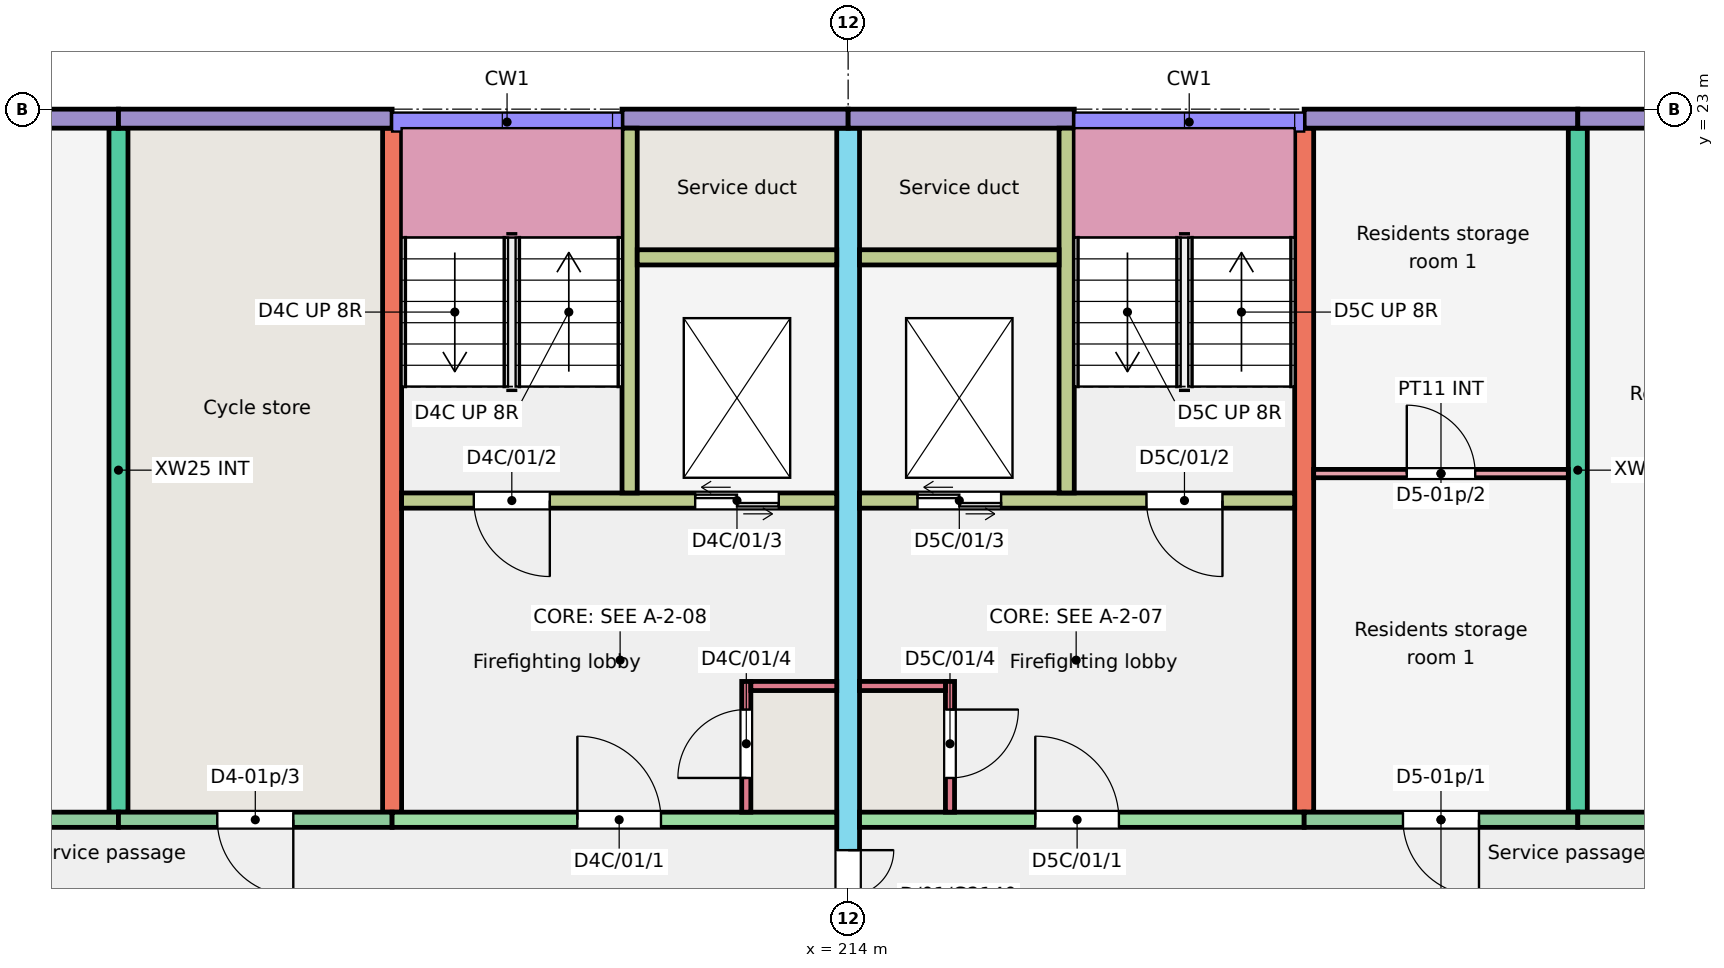
"""IFC4 building model, lengths in metres.
Left out: names, types, materials, properties, quantities, classifications, styles, units other than length and angle.
Written with IfcOpenShell. Run it as: python <this file> out.ifc"""

import sys

from ifc_helpers import new_model, si_unit, direction, frame, frame_2d, origin, place, context, subcontext, project, spatial, rectangle, extrude, element, fill, save


model = new_model("IFC4")
c1 = context("Model", 3, precision=1e-05, world=origin(), true_north=direction((0.0, 1.0)))
c2 = subcontext(c1, "Body", "Model", "MODEL_VIEW")
j1 = project(units=[si_unit("LENGTHUNIT", "METRE"), si_unit("PLANEANGLEUNIT", "RADIAN")], contexts=[c1])
p1 = place(None, origin())
s1 = spatial("IfcSite", under=j1, at=p1, CompositionType="ELEMENT")
p2 = place(p1, origin())
s2 = spatial("IfcBuilding", under=s1, at=p2, CompositionType="ELEMENT")
p3 = place(p2, frame((0.0, 0.0, 3.0)))
s3 = spatial("IfcBuildingStorey", under=s2, at=p3, CompositionType="ELEMENT", Elevation=3.0)
for number, where, z_axis, x_axis in (
    (1, (204.4, 13.75, 0.0), (0.0, 0.0, 1.0), (0.0, 1.0, 0.0)),
    (2, (208.0, 13.75, 0.0), (0.0, 0.0, 1.0), (0.0, 1.0, 0.0)),
):
    element("IfcWall", number, at=place(p3, frame(where, z_axis=z_axis, x_axis=x_axis)), inside=s3, PredefinedType="SHEAR", context=c2, shape_type="SweptSolid", body=[
        extrude(rectangle(XDim=9.0, YDim=0.25, at=frame_2d((4.5, 0.0))), origin(), (0.0, 0.0, 1.0), 3.0),
    ])
p4 = place(p3, frame((214.0, 11.75, 0.0), z_axis=(0.0, 0.0, 1.0), x_axis=(0.0, 1.0, 0.0)))
e3 = element("IfcWall", 3, at=p4, inside=s3, PredefinedType="SHEAR", context=c2, shape_type="SweptSolid", body=[
    extrude(rectangle(XDim=11.0, YDim=0.3, at=frame_2d((5.5, 0.0))), origin(), (0.0, 0.0, 1.0), 3.0),
])
p5 = place(p4, frame((0.3, 0.0, 0.0)))
e4 = element("IfcOpeningElement", 4, at=p5, cuts=e3, PredefinedType="OPENING", context=c2, shape_type="SweptSolid", body=[
    extrude(rectangle(XDim=1.2, YDim=2.1, at=frame_2d((0.6, 1.05))), frame((0.0, 0.16, 0.0), z_axis=(0.0, -1.0, 0.0), x_axis=(1.0, 0.0, 0.0)), (0.0, 0.0, 1.0), 0.32),
])
for number, where, z_axis, x_axis in (
    (5, (220.0, 13.75, 0.0), (0.0, 0.0, 1.0), (0.0, 1.0, 0.0)),
    (6, (223.6, 13.75, 0.0), (0.0, 0.0, 1.0), (0.0, 1.0, 0.0)),
):
    element("IfcWall", number, at=place(p3, frame(where, z_axis=z_axis, x_axis=x_axis)), inside=s3, PredefinedType="SHEAR", context=c2, shape_type="SweptSolid", body=[
        extrude(rectangle(XDim=9.0, YDim=0.25, at=frame_2d((4.5, 0.0))), origin(), (0.0, 0.0, 1.0), 3.0),
    ])
p6 = place(p3, frame((200.8, 22.875, 0.0), z_axis=(0.0, 0.0, 1.0), x_axis=(1.0, 0.0, 0.0)))
e7 = element("IfcWall", 7, at=p6, inside=s3, PredefinedType="SOLIDWALL", context=c2, shape_type="SweptSolid", body=[
    extrude(rectangle(XDim=3.6, YDim=0.25, at=frame_2d((1.8, 0.0))), origin(), (0.0, 0.0, 1.0), 3.0),
])
p7 = place(p3, frame((200.8, 13.65, 0.0), z_axis=(0.0, 0.0, 1.0), x_axis=(1.0, 0.0, 0.0)))
e8 = element("IfcWall", 8, at=p7, inside=s3, PredefinedType="SOLIDWALL", context=c2, shape_type="SweptSolid", body=[
    extrude(rectangle(XDim=3.6, YDim=0.2, at=frame_2d((1.8, 0.0))), origin(), (0.0, 0.0, 1.0), 3.0),
])
p8 = place(p7, frame((1.3, 0.0, 0.0)))
e9 = element("IfcOpeningElement", 9, at=p8, cuts=e8, PredefinedType="OPENING", context=c2, shape_type="SweptSolid", body=[
    extrude(rectangle(XDim=1.0, YDim=2.1, at=frame_2d((0.5, 1.05))), frame((0.0, 0.11, 0.0), z_axis=(0.0, -1.0, 0.0), x_axis=(1.0, 0.0, 0.0)), (0.0, 0.0, 1.0), 0.22),
])
p9 = place(p3, frame((204.4, 22.875, 0.0), z_axis=(0.0, 0.0, 1.0), x_axis=(1.0, 0.0, 0.0)))
e10 = element("IfcWall", 10, at=p9, inside=s3, PredefinedType="SOLIDWALL", context=c2, shape_type="SweptSolid", body=[
    extrude(rectangle(XDim=3.6, YDim=0.25, at=frame_2d((1.8, 0.0))), origin(), (0.0, 0.0, 1.0), 3.0),
])
p10 = place(p3, frame((204.4, 13.65, 0.0), z_axis=(0.0, 0.0, 1.0), x_axis=(1.0, 0.0, 0.0)))
e11 = element("IfcWall", 11, at=p10, inside=s3, PredefinedType="SOLIDWALL", context=c2, shape_type="SweptSolid", body=[
    extrude(rectangle(XDim=3.6, YDim=0.2, at=frame_2d((1.8, 0.0))), origin(), (0.0, 0.0, 1.0), 3.0),
])
p11 = place(p10, frame((1.3, 0.0, 0.0)))
e12 = element("IfcOpeningElement", 12, at=p11, cuts=e11, PredefinedType="OPENING", context=c2, shape_type="SweptSolid", body=[
    extrude(rectangle(XDim=1.0, YDim=2.1, at=frame_2d((0.5, 1.05))), frame((0.0, 0.11, 0.0), z_axis=(0.0, -1.0, 0.0), x_axis=(1.0, 0.0, 0.0)), (0.0, 0.0, 1.0), 0.22),
])
p12 = place(p3, frame((211.025, 22.875, 0.0), z_axis=(0.0, 0.0, 1.0), x_axis=(1.0, 0.0, 0.0)))
e13 = element("IfcWall", 13, at=p12, inside=s3, PredefinedType="SOLIDWALL", context=c2, shape_type="SweptSolid", body=[
    extrude(rectangle(XDim=2.975, YDim=0.25, at=frame_2d((1.488, 0.0))), origin(), (0.0, 0.0, 1.0), 3.0),
])
p13 = place(p3, frame((208.0, 13.65, 0.0), z_axis=(0.0, 0.0, 1.0), x_axis=(1.0, 0.0, 0.0)))
e14 = element("IfcWall", 14, at=p13, inside=s3, PredefinedType="SHEAR", context=c2, shape_type="SweptSolid", body=[
    extrude(rectangle(XDim=5.85, YDim=0.2, at=frame_2d((2.925, 0.0))), origin(), (0.0, 0.0, 1.0), 3.0),
])
p14 = place(p13, frame((2.438, 0.0, 0.0)))
e15 = element("IfcOpeningElement", 15, at=p14, cuts=e14, PredefinedType="OPENING", context=c2, shape_type="SweptSolid", body=[
    extrude(rectangle(XDim=1.1, YDim=2.1, at=frame_2d((0.55, 1.05))), frame((0.0, 0.11, 0.0), z_axis=(0.0, -1.0, 0.0), x_axis=(1.0, 0.0, 0.0)), (0.0, 0.0, 1.0), 0.22),
])
p15 = place(p3, frame((208.125, 17.85, 0.0), z_axis=(0.0, 0.0, 1.0), x_axis=(1.0, 0.0, 0.0)))
e16 = element("IfcWall", 16, at=p15, inside=s3, PredefinedType="SHEAR", context=c2, shape_type="SweptSolid", body=[
    extrude(rectangle(XDim=5.725, YDim=0.2, at=frame_2d((2.863, 0.0))), origin(), (0.0, 0.0, 1.0), 3.0),
])
p16 = place(p15, frame((0.95, 0.0, 0.0)))
e17 = element("IfcOpeningElement", 17, at=p16, cuts=e16, PredefinedType="OPENING", context=c2, shape_type="SweptSolid", body=[
    extrude(rectangle(XDim=1.0, YDim=2.1, at=frame_2d((0.5, 1.05))), frame((0.0, 0.11, 0.0), z_axis=(0.0, -1.0, 0.0), x_axis=(1.0, 0.0, 0.0)), (0.0, 0.0, 1.0), 0.22),
])
p17 = place(p15, frame((3.863, 0.0, 0.0)))
e18 = element("IfcOpeningElement", 18, at=p17, cuts=e16, PredefinedType="OPENING", context=c2, shape_type="SweptSolid", body=[
    extrude(rectangle(XDim=1.1, YDim=2.1, at=frame_2d((0.55, 1.05))), frame((0.0, 0.11, 0.0), z_axis=(0.0, -1.0, 0.0), x_axis=(1.0, 0.0, 0.0)), (0.0, 0.0, 1.0), 0.22),
])
p18 = place(p3, frame((211.125, 17.95, 0.0), z_axis=(0.0, 0.0, 1.0), x_axis=(0.0, 1.0, 0.0)))
e19 = element("IfcWall", 19, at=p18, inside=s3, PredefinedType="SHEAR", context=c2, shape_type="SweptSolid", body=[
    extrude(rectangle(XDim=4.8, YDim=0.2, at=frame_2d((2.4, 0.0))), origin(), (0.0, 0.0, 1.0), 3.0),
])
p19 = place(p3, frame((211.225, 21.05, 0.0), z_axis=(0.0, 0.0, 1.0), x_axis=(1.0, 0.0, 0.0)))
e20 = element("IfcWall", 20, at=p19, inside=s3, PredefinedType="SHEAR", context=c2, shape_type="SweptSolid", body=[
    extrude(rectangle(XDim=2.625, YDim=0.2, at=frame_2d((1.312, 0.0))), origin(), (0.0, 0.0, 1.0), 3.0),
])
p20 = place(p3, frame((212.66, 13.75, 0.0), z_axis=(0.0, 0.0, 1.0), x_axis=(0.0, 1.0, 0.0)))
e21 = element("IfcWall", 21, at=p20, inside=s3, PredefinedType="SHEAR", context=c2, shape_type="SweptSolid", body=[
    extrude(rectangle(XDim=1.72, YDim=0.12, at=frame_2d((0.86, 0.0))), origin(), (0.0, 0.0, 1.0), 3.0),
])
p21 = place(p20, frame((0.45, 0.0, 0.0)))
e22 = element("IfcOpeningElement", 22, at=p21, cuts=e21, PredefinedType="OPENING", context=c2, shape_type="SweptSolid", body=[
    extrude(rectangle(XDim=0.9, YDim=2.1, at=frame_2d((0.45, 1.05))), frame((0.0, 0.07, 0.0), z_axis=(0.0, -1.0, 0.0), x_axis=(1.0, 0.0, 0.0)), (0.0, 0.0, 1.0), 0.14),
])
p22 = place(p3, frame((212.72, 15.41, 0.0), z_axis=(0.0, 0.0, 1.0), x_axis=(1.0, 0.0, 0.0)))
e23 = element("IfcWall", 23, at=p22, inside=s3, PredefinedType="SHEAR", context=c2, shape_type="SweptSolid", body=[
    extrude(rectangle(XDim=1.13, YDim=0.12, at=frame_2d((0.565, 0.0))), origin(), (0.0, 0.0, 1.0), 3.0),
])
p23 = place(p3, frame((214.0, 22.875, 0.0), z_axis=(0.0, 0.0, 1.0), x_axis=(1.0, 0.0, 0.0)))
e24 = element("IfcWall", 24, at=p23, inside=s3, PredefinedType="SOLIDWALL", context=c2, shape_type="SweptSolid", body=[
    extrude(rectangle(XDim=2.975, YDim=0.25, at=frame_2d((1.488, 0.0))), origin(), (0.0, 0.0, 1.0), 3.0),
])
p24 = place(p3, frame((214.15, 13.65, 0.0), z_axis=(0.0, 0.0, 1.0), x_axis=(1.0, 0.0, 0.0)))
e25 = element("IfcWall", 25, at=p24, inside=s3, PredefinedType="SHEAR", context=c2, shape_type="SweptSolid", body=[
    extrude(rectangle(XDim=5.85, YDim=0.2, at=frame_2d((2.925, 0.0))), origin(), (0.0, 0.0, 1.0), 3.0),
])
p25 = place(p24, frame((2.312, 0.0, 0.0)))
e26 = element("IfcOpeningElement", 26, at=p25, cuts=e25, PredefinedType="OPENING", context=c2, shape_type="SweptSolid", body=[
    extrude(rectangle(XDim=1.1, YDim=2.1, at=frame_2d((0.55, 1.05))), frame((0.0, 0.11, 0.0), z_axis=(0.0, -1.0, 0.0), x_axis=(1.0, 0.0, 0.0)), (0.0, 0.0, 1.0), 0.22),
])
p26 = place(p3, frame((214.15, 17.85, 0.0), z_axis=(0.0, 0.0, 1.0), x_axis=(1.0, 0.0, 0.0)))
e27 = element("IfcWall", 27, at=p26, inside=s3, PredefinedType="SHEAR", context=c2, shape_type="SweptSolid", body=[
    extrude(rectangle(XDim=5.725, YDim=0.2, at=frame_2d((2.863, 0.0))), origin(), (0.0, 0.0, 1.0), 3.0),
])
p27 = place(p26, frame((3.775, 0.0, 0.0)))
e28 = element("IfcOpeningElement", 28, at=p27, cuts=e27, PredefinedType="OPENING", context=c2, shape_type="SweptSolid", body=[
    extrude(rectangle(XDim=1.0, YDim=2.1, at=frame_2d((0.5, 1.05))), frame((0.0, 0.11, 0.0), z_axis=(0.0, -1.0, 0.0), x_axis=(1.0, 0.0, 0.0)), (0.0, 0.0, 1.0), 0.22),
])
p28 = place(p26, frame((0.762, 0.0, 0.0)))
e29 = element("IfcOpeningElement", 29, at=p28, cuts=e27, PredefinedType="OPENING", context=c2, shape_type="SweptSolid", body=[
    extrude(rectangle(XDim=1.1, YDim=2.1, at=frame_2d((0.55, 1.05))), frame((0.0, 0.11, 0.0), z_axis=(0.0, -1.0, 0.0), x_axis=(1.0, 0.0, 0.0)), (0.0, 0.0, 1.0), 0.22),
])
p29 = place(p3, frame((216.875, 17.95, 0.0), z_axis=(0.0, 0.0, 1.0), x_axis=(0.0, 1.0, 0.0)))
e30 = element("IfcWall", 30, at=p29, inside=s3, PredefinedType="SHEAR", context=c2, shape_type="SweptSolid", body=[
    extrude(rectangle(XDim=4.8, YDim=0.2, at=frame_2d((2.4, 0.0))), origin(), (0.0, 0.0, 1.0), 3.0),
])
p30 = place(p3, frame((214.15, 21.05, 0.0), z_axis=(0.0, 0.0, 1.0), x_axis=(1.0, 0.0, 0.0)))
e31 = element("IfcWall", 31, at=p30, inside=s3, PredefinedType="SHEAR", context=c2, shape_type="SweptSolid", body=[
    extrude(rectangle(XDim=2.625, YDim=0.2, at=frame_2d((1.312, 0.0))), origin(), (0.0, 0.0, 1.0), 3.0),
])
p31 = place(p3, frame((215.34, 13.75, 0.0), z_axis=(0.0, 0.0, 1.0), x_axis=(0.0, 1.0, 0.0)))
e32 = element("IfcWall", 32, at=p31, inside=s3, PredefinedType="SHEAR", context=c2, shape_type="SweptSolid", body=[
    extrude(rectangle(XDim=1.72, YDim=0.12, at=frame_2d((0.86, 0.0))), origin(), (0.0, 0.0, 1.0), 3.0),
])
p32 = place(p31, frame((0.45, 0.0, 0.0)))
e33 = element("IfcOpeningElement", 33, at=p32, cuts=e32, PredefinedType="OPENING", context=c2, shape_type="SweptSolid", body=[
    extrude(rectangle(XDim=0.9, YDim=2.1, at=frame_2d((0.45, 1.05))), frame((0.0, 0.07, 0.0), z_axis=(0.0, -1.0, 0.0), x_axis=(1.0, 0.0, 0.0)), (0.0, 0.0, 1.0), 0.14),
])
p33 = place(p3, frame((214.15, 15.41, 0.0), z_axis=(0.0, 0.0, 1.0), x_axis=(1.0, 0.0, 0.0)))
e34 = element("IfcWall", 34, at=p33, inside=s3, PredefinedType="SHEAR", context=c2, shape_type="SweptSolid", body=[
    extrude(rectangle(XDim=1.13, YDim=0.12, at=frame_2d((0.565, 0.0))), origin(), (0.0, 0.0, 1.0), 3.0),
])
p34 = place(p3, frame((220.0, 22.875, 0.0), z_axis=(0.0, 0.0, 1.0), x_axis=(1.0, 0.0, 0.0)))
e35 = element("IfcWall", 35, at=p34, inside=s3, PredefinedType="SOLIDWALL", context=c2, shape_type="SweptSolid", body=[
    extrude(rectangle(XDim=3.6, YDim=0.25, at=frame_2d((1.8, 0.0))), origin(), (0.0, 0.0, 1.0), 3.0),
])
p35 = place(p3, frame((220.0, 13.65, 0.0), z_axis=(0.0, 0.0, 1.0), x_axis=(1.0, 0.0, 0.0)))
e36 = element("IfcWall", 36, at=p35, inside=s3, PredefinedType="SOLIDWALL", context=c2, shape_type="SweptSolid", body=[
    extrude(rectangle(XDim=3.6, YDim=0.2, at=frame_2d((1.8, 0.0))), origin(), (0.0, 0.0, 1.0), 3.0),
])
p36 = place(p35, frame((1.3, 0.0, 0.0)))
e37 = element("IfcOpeningElement", 37, at=p36, cuts=e36, PredefinedType="OPENING", context=c2, shape_type="SweptSolid", body=[
    extrude(rectangle(XDim=1.0, YDim=2.1, at=frame_2d((0.5, 1.05))), frame((0.0, 0.11, 0.0), z_axis=(0.0, -1.0, 0.0), x_axis=(1.0, 0.0, 0.0)), (0.0, 0.0, 1.0), 0.22),
])
p37 = place(p3, frame((223.6, 22.875, 0.0), z_axis=(0.0, 0.0, 1.0), x_axis=(1.0, 0.0, 0.0)))
e38 = element("IfcWall", 38, at=p37, inside=s3, PredefinedType="SOLIDWALL", context=c2, shape_type="SweptSolid", body=[
    extrude(rectangle(XDim=3.6, YDim=0.25, at=frame_2d((1.8, 0.0))), origin(), (0.0, 0.0, 1.0), 3.0),
])
p38 = place(p3, frame((223.6, 13.65, 0.0), z_axis=(0.0, 0.0, 1.0), x_axis=(1.0, 0.0, 0.0)))
e39 = element("IfcWall", 39, at=p38, inside=s3, PredefinedType="SOLIDWALL", context=c2, shape_type="SweptSolid", body=[
    extrude(rectangle(XDim=3.6, YDim=0.2, at=frame_2d((1.8, 0.0))), origin(), (0.0, 0.0, 1.0), 3.0),
])
p39 = place(p38, frame((1.3, 0.0, 0.0)))
e40 = element("IfcOpeningElement", 40, at=p39, cuts=e39, PredefinedType="OPENING", context=c2, shape_type="SweptSolid", body=[
    extrude(rectangle(XDim=1.0, YDim=2.1, at=frame_2d((0.5, 1.05))), frame((0.0, 0.11, 0.0), z_axis=(0.0, -1.0, 0.0), x_axis=(1.0, 0.0, 0.0)), (0.0, 0.0, 1.0), 0.22),
])
p40 = place(p3, frame((220.125, 18.205, 0.0), z_axis=(0.0, 0.0, 1.0), x_axis=(1.0, 0.0, 0.0)))
e41 = element("IfcWall", 41, at=p40, inside=s3, PredefinedType="PARTITIONING", context=c2, shape_type="SweptSolid", body=[
    extrude(rectangle(XDim=3.35, YDim=0.11, at=frame_2d((1.675, 0.0))), origin(), (0.0, 0.0, 1.0), 2.8),
])
p41 = place(p40, frame((1.225, 0.0, 0.0)))
e42 = element("IfcOpeningElement", 42, at=p41, cuts=e41, PredefinedType="OPENING", context=c2, shape_type="SweptSolid", body=[
    extrude(rectangle(XDim=0.9, YDim=2.1, at=frame_2d((0.45, 1.05))), frame((0.0, 0.065, 0.0), z_axis=(0.0, -1.0, 0.0), x_axis=(1.0, 0.0, 0.0)), (0.0, 0.0, 1.0), 0.13),
])
p42 = place(p11, origin())
e43 = element("IfcDoor", 43, at=p42, inside=s3, OperationType="SINGLE_SWING_RIGHT", PredefinedType="DOOR", context=c2, shape_type="SweptSolid", body=[
    extrude(rectangle(XDim=1.0, YDim=2.1, at=frame_2d((0.5, 1.05))), frame((0.0, 0.025, 0.0), z_axis=(0.0, -1.0, 0.0), x_axis=(1.0, 0.0, 0.0)), (0.0, 0.0, 1.0), 0.05),
])
fill(e12, e43)
p43 = place(p36, origin())
e44 = element("IfcDoor", 44, at=p43, inside=s3, OperationType="SINGLE_SWING_RIGHT", PredefinedType="DOOR", context=c2, shape_type="SweptSolid", body=[
    extrude(rectangle(XDim=1.0, YDim=2.1, at=frame_2d((0.5, 1.05))), frame((0.0, 0.025, 0.0), z_axis=(0.0, -1.0, 0.0), x_axis=(1.0, 0.0, 0.0)), (0.0, 0.0, 1.0), 0.05),
])
fill(e37, e44)
p44 = place(p41, origin())
e45 = element("IfcDoor", 45, at=p44, inside=s3, OperationType="SINGLE_SWING_LEFT", PredefinedType="DOOR", context=c2, shape_type="SweptSolid", body=[
    extrude(rectangle(XDim=0.9, YDim=2.1, at=frame_2d((0.45, 1.05))), frame((0.0, 0.025, 0.0), z_axis=(0.0, -1.0, 0.0), x_axis=(1.0, 0.0, 0.0)), (0.0, 0.0, 1.0), 0.05),
])
fill(e42, e45)
p45 = place(p14, origin())
e46 = element("IfcDoor", 46, at=p45, inside=s3, OperationType="SINGLE_SWING_LEFT", PredefinedType="DOOR", context=c2, shape_type="SweptSolid", body=[
    extrude(rectangle(XDim=1.1, YDim=2.1, at=frame_2d((0.55, 1.05))), frame((0.0, 0.025, 0.0), z_axis=(0.0, -1.0, 0.0), x_axis=(1.0, 0.0, 0.0)), (0.0, 0.0, 1.0), 0.05),
])
fill(e15, e46)
p46 = place(p16, origin())
e47 = element("IfcDoor", 47, at=p46, inside=s3, OperationType="SINGLE_SWING_RIGHT", PredefinedType="DOOR", context=c2, shape_type="SweptSolid", body=[
    extrude(rectangle(XDim=1.0, YDim=2.1, at=frame_2d((0.5, 1.05))), frame((0.0, 0.025, 0.0), z_axis=(0.0, -1.0, 0.0), x_axis=(1.0, 0.0, 0.0)), (0.0, 0.0, 1.0), 0.05),
])
fill(e17, e47)
p47 = place(p17, origin())
e48 = element("IfcDoor", 48, at=p47, inside=s3, OperationType="DOUBLE_DOOR_SLIDING", PredefinedType="DOOR", context=c2, shape_type="SweptSolid", body=[
    extrude(rectangle(XDim=1.1, YDim=2.1, at=frame_2d((0.55, 1.05))), frame((0.0, 0.025, 0.0), z_axis=(0.0, -1.0, 0.0), x_axis=(1.0, 0.0, 0.0)), (0.0, 0.0, 1.0), 0.05),
])
fill(e18, e48)
p48 = place(p21, origin())
e49 = element("IfcDoor", 49, at=p48, inside=s3, OperationType="SINGLE_SWING_LEFT", PredefinedType="DOOR", context=c2, shape_type="SweptSolid", body=[
    extrude(rectangle(XDim=0.9, YDim=2.1, at=frame_2d((0.45, 1.05))), frame((0.0, 0.025, 0.0), z_axis=(0.0, -1.0, 0.0), x_axis=(1.0, 0.0, 0.0)), (0.0, 0.0, 1.0), 0.05),
])
fill(e22, e49)
p49 = place(p25, origin())
e50 = element("IfcDoor", 50, at=p49, inside=s3, OperationType="SINGLE_SWING_LEFT", PredefinedType="DOOR", context=c2, shape_type="SweptSolid", body=[
    extrude(rectangle(XDim=1.1, YDim=2.1, at=frame_2d((0.55, 1.05))), frame((0.0, 0.025, 0.0), z_axis=(0.0, -1.0, 0.0), x_axis=(1.0, 0.0, 0.0)), (0.0, 0.0, 1.0), 0.05),
])
fill(e26, e50)
p50 = place(p27, origin())
e51 = element("IfcDoor", 51, at=p50, inside=s3, OperationType="SINGLE_SWING_RIGHT", PredefinedType="DOOR", context=c2, shape_type="SweptSolid", body=[
    extrude(rectangle(XDim=1.0, YDim=2.1, at=frame_2d((0.5, 1.05))), frame((0.0, 0.025, 0.0), z_axis=(0.0, -1.0, 0.0), x_axis=(1.0, 0.0, 0.0)), (0.0, 0.0, 1.0), 0.05),
])
fill(e28, e51)
p51 = place(p28, origin())
e52 = element("IfcDoor", 52, at=p51, inside=s3, OperationType="DOUBLE_DOOR_SLIDING", PredefinedType="DOOR", context=c2, shape_type="SweptSolid", body=[
    extrude(rectangle(XDim=1.1, YDim=2.1, at=frame_2d((0.55, 1.05))), frame((0.0, 0.025, 0.0), z_axis=(0.0, -1.0, 0.0), x_axis=(1.0, 0.0, 0.0)), (0.0, 0.0, 1.0), 0.05),
])
fill(e29, e52)
p52 = place(p32, origin())
e53 = element("IfcDoor", 53, at=p52, inside=s3, OperationType="SINGLE_SWING_RIGHT", PredefinedType="DOOR", context=c2, shape_type="SweptSolid", body=[
    extrude(rectangle(XDim=0.9, YDim=2.1, at=frame_2d((0.45, 1.05))), frame((0.0, 0.025, 0.0), z_axis=(0.0, -1.0, 0.0), x_axis=(1.0, 0.0, 0.0)), (0.0, 0.0, 1.0), 0.05),
])
fill(e33, e53)
p53 = place(p5, origin())
e54 = element("IfcDoor", 54, at=p53, inside=s3, OperationType="DOUBLE_DOOR_SINGLE_SWING", PredefinedType="DOOR", context=c2, shape_type="SweptSolid", body=[
    extrude(rectangle(XDim=1.2, YDim=2.1, at=frame_2d((0.6, 1.05))), frame((0.0, 0.025, 0.0), z_axis=(0.0, -1.0, 0.0), x_axis=(1.0, 0.0, 0.0)), (0.0, 0.0, 1.0), 0.05),
])
fill(e4, e54)
save(model, sys.argv[1])
